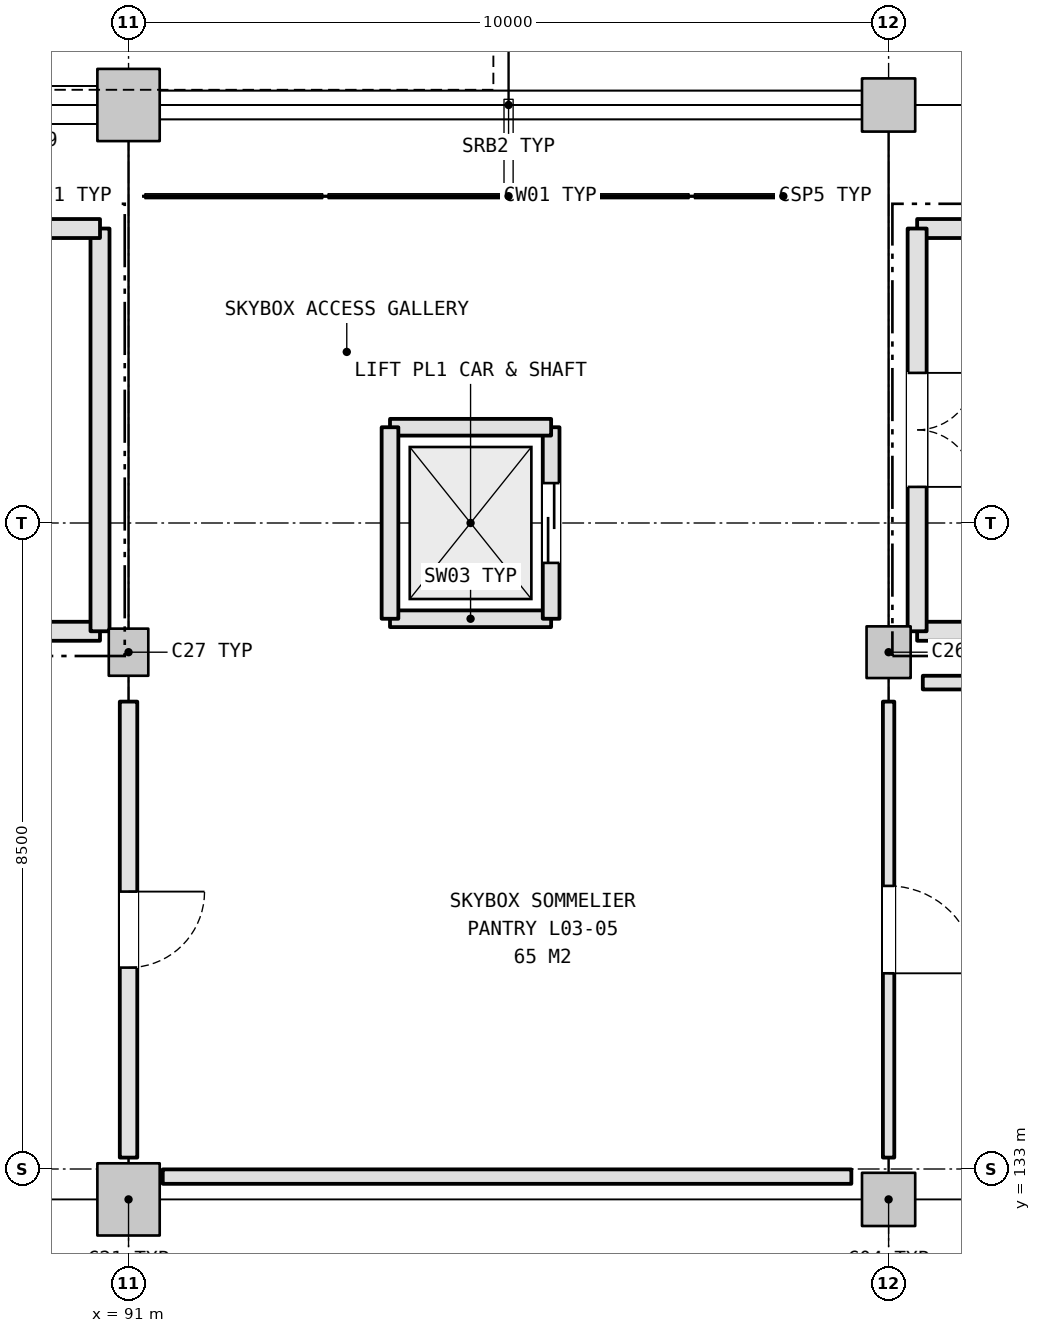
"""IFC4 building model, lengths in metres.
Left out: names, types, materials, properties, quantities, classifications, styles, units other than length and angle.
Written with IfcOpenShell. Run it as: python <this file> out.ifc"""

import sys

from ifc_helpers import new_model, si_unit, direction, frame, frame_2d, origin, origin_2d, place, context, subcontext, project, spatial, rectangle, extrude, element, fill, save


model = new_model("IFC4")
c1 = context("Model", 3, precision=1e-05, world=origin(), true_north=direction((0.0, 1.0)))
c2 = subcontext(c1, "Body", "Model", "MODEL_VIEW")
j1 = project(units=[si_unit("LENGTHUNIT", "METRE"), si_unit("PLANEANGLEUNIT", "RADIAN")], contexts=[c1])
p1 = place(None, origin())
s1 = spatial("IfcSite", under=j1, at=p1, CompositionType="ELEMENT")
p2 = place(p1, origin())
s2 = spatial("IfcBuilding", under=s1, at=p2, CompositionType="ELEMENT")
p3 = place(p2, frame((0.0, 0.0, 16.2)))
s3 = spatial("IfcBuildingStorey", under=s2, at=p3, CompositionType="ELEMENT", Elevation=16.2)
p4 = place(p3, frame((101.0, 132.6, 0.0), z_axis=(0.0, 0.0, 1.0), x_axis=(1.0, 0.0, 0.0)))
e1 = element("IfcColumn", 1, at=p4, inside=s3, PredefinedType="COLUMN", context=c2, shape_type="SweptSolid", body=[
    extrude(rectangle(XDim=0.7, YDim=0.7, at=origin_2d()), origin(), (0.0, 0.0, 1.0), 5.4),
])
p5 = place(p3, frame((101.0, 139.8, 0.0), z_axis=(0.0, 0.0, 1.0), x_axis=(1.0, 0.0, 0.0)))
e2 = element("IfcColumn", 2, at=p5, inside=s3, PredefinedType="COLUMN", context=c2, shape_type="SweptSolid", body=[
    extrude(rectangle(XDim=0.58, YDim=0.68, at=origin_2d()), origin(), (0.0, 0.0, 1.0), 5.4),
])
p6 = place(p3, frame((101.0, 147.0, 0.0), z_axis=(0.0, 0.0, 1.0), x_axis=(1.0, 0.0, 0.0)))
e3 = element("IfcColumn", 3, at=p6, inside=s3, PredefinedType="COLUMN", context=c2, shape_type="SweptSolid", body=[
    extrude(rectangle(XDim=0.7, YDim=0.7, at=origin_2d()), origin(), (0.0, 0.0, 1.0), 5.4),
])
p7 = place(p3, frame((91.0, 132.6, 0.0), z_axis=(0.0, 0.0, 1.0), x_axis=(1.0, 0.0, 0.0)))
e4 = element("IfcColumn", 4, at=p7, inside=s3, PredefinedType="COLUMN", context=c2, shape_type="SweptSolid", body=[
    extrude(rectangle(XDim=0.82, YDim=0.95, at=origin_2d()), origin(), (0.0, 0.0, 1.0), 5.4),
])
p8 = place(p3, frame((91.0, 139.8, 0.0), z_axis=(0.0, 0.0, 1.0), x_axis=(1.0, 0.0, 0.0)))
e5 = element("IfcColumn", 5, at=p8, inside=s3, PredefinedType="COLUMN", context=c2, shape_type="SweptSolid", body=[
    extrude(rectangle(XDim=0.52, YDim=0.62, at=origin_2d()), origin(), (0.0, 0.0, 1.0), 5.4),
])
p9 = place(p3, frame((91.0, 147.0, 0.0), z_axis=(0.0, 0.0, 1.0), x_axis=(1.0, 0.0, 0.0)))
e6 = element("IfcColumn", 6, at=p9, inside=s3, PredefinedType="COLUMN", context=c2, shape_type="SweptSolid", body=[
    extrude(rectangle(XDim=0.82, YDim=0.95, at=origin_2d()), origin(), (0.0, 0.0, 1.0), 5.4),
])
p10 = place(p3, frame((81.375, 140.075, 0.0), z_axis=(0.0, 0.0, 1.0), x_axis=(1.0, 0.0, 0.0)))
e7 = element("IfcWall", 7, at=p10, inside=s3, PredefinedType="SHEAR", context=c2, shape_type="SweptSolid", body=[
    extrude(rectangle(XDim=9.249, YDim=0.25, at=frame_2d((4.625, 0.0))), origin(), (0.0, 0.0, 1.0), 5.14),
])
p11 = place(p3, frame((90.625, 140.075, 0.0), z_axis=(0.0, 0.0, 1.0), x_axis=(0.0, 1.0, 0.0)))
e8 = element("IfcWall", 8, at=p11, inside=s3, PredefinedType="SHEAR", context=c2, shape_type="SweptSolid", body=[
    extrude(rectangle(XDim=5.299, YDim=0.25, at=frame_2d((2.649, 0.0))), origin(), (0.0, 0.0, 1.0), 5.14),
])
for number, where, z_axis, x_axis in (
    (9, (90.625, 145.375, 0.0), (0.0, 0.0, 1.0), (-1.0, 0.0, 0.0)),
    (10, (101.375, 140.075, 0.0), (0.0, 0.0, 1.0), (1.0, 0.0, 0.0)),
    (11, (110.625, 145.375, 0.0), (0.0, 0.0, 1.0), (-1.0, 0.0, 0.0)),
):
    element("IfcWall", number, at=place(p3, frame(where, z_axis=z_axis, x_axis=x_axis)), inside=s3, PredefinedType="SHEAR", context=c2, shape_type="SweptSolid", body=[
        extrude(rectangle(XDim=9.249, YDim=0.25, at=frame_2d((4.625, 0.0))), origin(), (0.0, 0.0, 1.0), 5.14),
    ])
p12 = place(p3, frame((101.375, 145.375, 0.0), z_axis=(0.0, 0.0, 1.0), x_axis=(0.0, -1.0, 0.0)))
e12 = element("IfcWall", 12, at=p12, inside=s3, PredefinedType="SHEAR", context=c2, shape_type="SweptSolid", body=[
    extrude(rectangle(XDim=5.299, YDim=0.25, at=frame_2d((2.649, 0.0))), origin(), (0.0, 0.0, 1.0), 5.14),
])
p13 = place(p12, frame((1.9, 0.0, 0.0)))
e13 = element("IfcOpeningElement", 13, at=p13, cuts=e12, PredefinedType="OPENING", context=c2, shape_type="SweptSolid", body=[
    extrude(rectangle(XDim=1.5, YDim=2.2, at=frame_2d((0.75, 1.1))), frame((0.0, 0.135, 0.0), z_axis=(0.0, -1.0, 0.0), x_axis=(1.0, 0.0, 0.0)), (0.0, 0.0, 1.0), 0.27),
])
p14 = place(p3, frame((94.44, 140.24, 0.0), z_axis=(0.0, 0.0, 1.0), x_axis=(1.0, 0.0, 0.0)))
e14 = element("IfcWall", 14, at=p14, inside=s3, PredefinedType="SHEAR", context=c2, shape_type="SweptSolid", body=[
    extrude(rectangle(XDim=2.12, YDim=0.22, at=frame_2d((1.06, 0.0))), origin(), (0.0, 0.0, 1.0), 5.14),
])
p15 = place(p3, frame((96.56, 140.24, 0.0), z_axis=(0.0, 0.0, 1.0), x_axis=(0.0, 1.0, 0.0)))
e15 = element("IfcWall", 15, at=p15, inside=s3, PredefinedType="SHEAR", context=c2, shape_type="SweptSolid", body=[
    extrude(rectangle(XDim=2.52, YDim=0.22, at=frame_2d((1.26, 0.0))), origin(), (0.0, 0.0, 1.0), 5.14),
])
p16 = place(p15, frame((0.735, 0.0, 0.0)))
e16 = element("IfcOpeningElement", 16, at=p16, cuts=e15, PredefinedType="OPENING", context=c2, shape_type="SweptSolid", body=[
    extrude(rectangle(XDim=1.05, YDim=2.15, at=frame_2d((0.525, 1.075))), frame((0.0, 0.12, 0.0), z_axis=(0.0, -1.0, 0.0), x_axis=(1.0, 0.0, 0.0)), (0.0, 0.0, 1.0), 0.24),
])
p17 = place(p3, frame((96.56, 142.76, 0.0), z_axis=(0.0, 0.0, 1.0), x_axis=(-1.0, 0.0, 0.0)))
e17 = element("IfcWall", 17, at=p17, inside=s3, PredefinedType="SHEAR", context=c2, shape_type="SweptSolid", body=[
    extrude(rectangle(XDim=2.12, YDim=0.22, at=frame_2d((1.06, 0.0))), origin(), (0.0, 0.0, 1.0), 5.14),
])
p18 = place(p3, frame((94.44, 142.76, 0.0), z_axis=(0.0, 0.0, 1.0), x_axis=(0.0, -1.0, 0.0)))
e18 = element("IfcWall", 18, at=p18, inside=s3, PredefinedType="SHEAR", context=c2, shape_type="SweptSolid", body=[
    extrude(rectangle(XDim=2.52, YDim=0.22, at=frame_2d((1.26, 0.0))), origin(), (0.0, 0.0, 1.0), 5.14),
])
p19 = place(p3, frame((101.0, 133.15, 0.0), z_axis=(0.0, 0.0, 1.0), x_axis=(0.0, 1.0, 0.0)))
e19 = element("IfcWall", 19, at=p19, inside=s3, PredefinedType="PARTITIONING", context=c2, shape_type="SweptSolid", body=[
    extrude(rectangle(XDim=6.0, YDim=0.15, at=frame_2d((3.0, 0.0))), origin(), (0.0, 0.0, 1.0), 4.385),
])
p20 = place(p19, frame((2.425, 0.0, 0.0)))
e20 = element("IfcOpeningElement", 20, at=p20, cuts=e19, PredefinedType="OPENING", context=c2, shape_type="SweptSolid", body=[
    extrude(rectangle(XDim=1.15, YDim=2.2, at=frame_2d((0.575, 1.1))), frame((0.0, 0.085, 0.0), z_axis=(0.0, -1.0, 0.0), x_axis=(1.0, 0.0, 0.0)), (0.0, 0.0, 1.0), 0.17),
])
p21 = place(p3, frame((101.45, 139.4, 0.0), z_axis=(0.0, 0.0, 1.0), x_axis=(1.0, 0.0, 0.0)))
e21 = element("IfcWall", 21, at=p21, inside=s3, PredefinedType="PARTITIONING", context=c2, shape_type="SweptSolid", body=[
    extrude(rectangle(XDim=9.06, YDim=0.18, at=frame_2d((4.53, 0.0))), origin(), (0.0, 0.0, 1.0), 5.12),
])
p22 = place(p3, frame((91.0, 133.15, 0.0), z_axis=(0.0, 0.0, 1.0), x_axis=(0.0, 1.0, 0.0)))
e22 = element("IfcWall", 22, at=p22, inside=s3, PredefinedType="PLUMBINGWALL", context=c2, shape_type="SweptSolid", body=[
    extrude(rectangle(XDim=6.0, YDim=0.23, at=frame_2d((3.0, 0.0))), origin(), (0.0, 0.0, 1.0), 4.305),
])
p23 = place(p22, frame((2.5, 0.0, 0.0)))
e23 = element("IfcOpeningElement", 23, at=p23, cuts=e22, PredefinedType="OPENING", context=c2, shape_type="SweptSolid", body=[
    extrude(rectangle(XDim=1.0, YDim=2.1, at=frame_2d((0.5, 1.05))), frame((0.0, 0.125, 0.0), z_axis=(0.0, -1.0, 0.0), x_axis=(1.0, 0.0, 0.0)), (0.0, 0.0, 1.0), 0.25),
])
p24 = place(p3, frame((100.51, 132.9, 0.0), z_axis=(0.0, 0.0, 1.0), x_axis=(-1.0, 0.0, 0.0)))
e24 = element("IfcWall", 24, at=p24, inside=s3, PredefinedType="PARTITIONING", context=c2, shape_type="SweptSolid", body=[
    extrude(rectangle(XDim=9.06, YDim=0.19, at=frame_2d((4.53, 0.0))), origin(), (0.0, 0.0, 1.0), 4.505),
])
p25 = place(p13, origin())
e25 = element("IfcDoor", 25, at=p25, inside=s3, OperationType="DOUBLE_DOOR_SINGLE_SWING", PredefinedType="DOOR", context=c2, shape_type="SweptSolid", body=[
    extrude(rectangle(XDim=1.5, YDim=2.2, at=frame_2d((0.75, 1.1))), frame((0.0, 0.025, 0.0), z_axis=(0.0, -1.0, 0.0), x_axis=(1.0, 0.0, 0.0)), (0.0, 0.0, 1.0), 0.05),
])
fill(e13, e25)
p26 = place(p16, origin())
e26 = element("IfcDoor", 26, at=p26, inside=s3, OperationType="DOUBLE_DOOR_SLIDING", PredefinedType="DOOR", context=c2, shape_type="SweptSolid", body=[
    extrude(rectangle(XDim=1.05, YDim=2.15, at=frame_2d((0.525, 1.075))), frame((0.0, 0.025, 0.0), z_axis=(0.0, -1.0, 0.0), x_axis=(1.0, 0.0, 0.0)), (0.0, 0.0, 1.0), 0.05),
])
fill(e16, e26)
p27 = place(p20, frame((1.15, 0.0, 0.0), z_axis=(0.0, 0.0, 1.0), x_axis=(-1.0, 0.0, 0.0)))
e27 = element("IfcDoor", 27, at=p27, inside=s3, OperationType="SINGLE_SWING_LEFT", PredefinedType="DOOR", context=c2, shape_type="SweptSolid", body=[
    extrude(rectangle(XDim=1.15, YDim=2.2, at=frame_2d((0.575, 1.1))), frame((0.0, 0.025, 0.0), z_axis=(0.0, -1.0, 0.0), x_axis=(1.0, 0.0, 0.0)), (0.0, 0.0, 1.0), 0.05),
])
fill(e20, e27)
p28 = place(p23, frame((1.0, 0.0, 0.0), z_axis=(0.0, 0.0, 1.0), x_axis=(-1.0, 0.0, 0.0)))
e28 = element("IfcDoor", 28, at=p28, inside=s3, OperationType="SINGLE_SWING_RIGHT", PredefinedType="DOOR", context=c2, shape_type="SweptSolid", body=[
    extrude(rectangle(XDim=1.0, YDim=2.1, at=frame_2d((0.5, 1.05))), frame((0.0, 0.025, 0.0), z_axis=(0.0, -1.0, 0.0), x_axis=(1.0, 0.0, 0.0)), (0.0, 0.0, 1.0), 0.05),
])
fill(e23, e28)
save(model, sys.argv[1])
